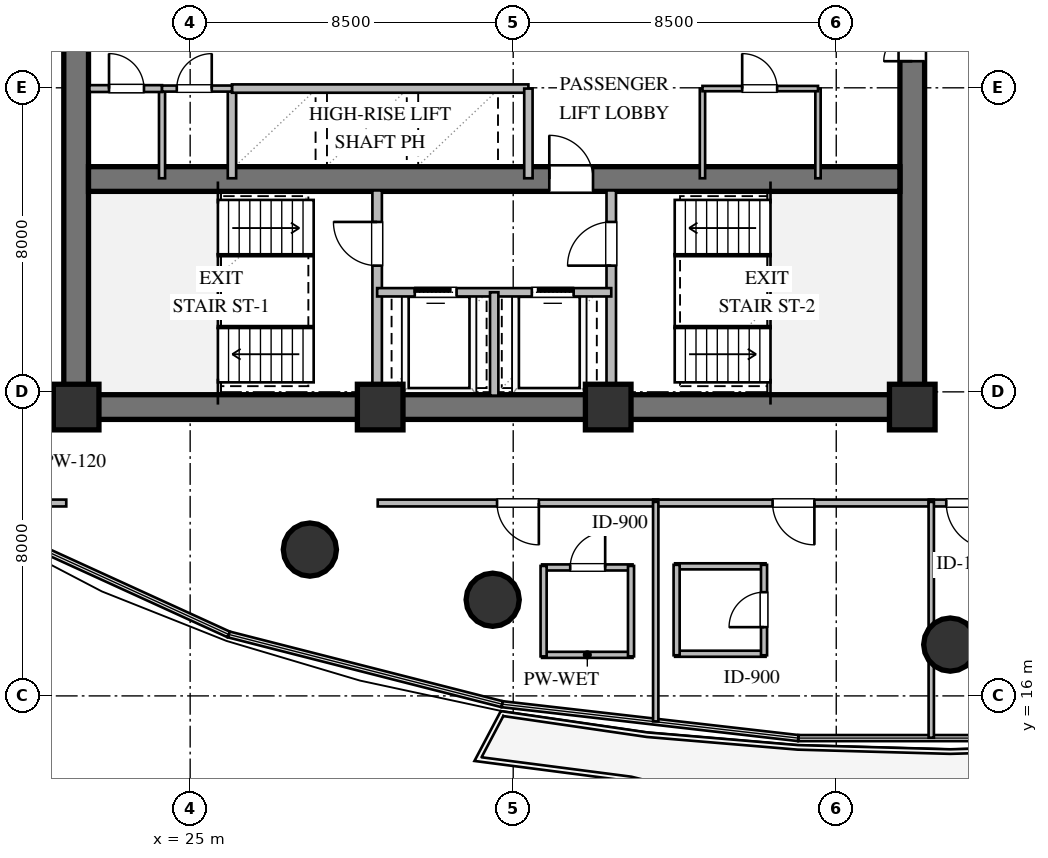
"""IFC4 building model, lengths in metres.
Left out: names, types, materials, properties, quantities, classifications, styles, units other than length and angle.
Written with IfcOpenShell. Run it as: python <this file> out.ifc"""

import sys

from ifc_helpers import new_model, si_unit, direction, frame, frame_2d, origin, origin_2d, place, context, subcontext, project, spatial, rectangle, circle, extrude, element, fill, save


model = new_model("IFC4")
c1 = context("Model", 3, precision=1e-05, world=origin(), true_north=direction((0.0, 1.0)))
c2 = subcontext(c1, "Body", "Model", "MODEL_VIEW")
j1 = project(units=[si_unit("LENGTHUNIT", "METRE"), si_unit("PLANEANGLEUNIT", "RADIAN")], contexts=[c1])
p1 = place(None, origin())
s1 = spatial("IfcSite", under=j1, at=p1, CompositionType="ELEMENT")
p2 = place(p1, origin())
s2 = spatial("IfcBuilding", under=s1, at=p2, CompositionType="ELEMENT")
p3 = place(p2, frame((0.0, 0.0, 34.8)))
s3 = spatial("IfcBuildingStorey", under=s2, at=p3, CompositionType="ELEMENT", Elevation=34.8)
p4 = place(p3, frame((21.675, 23.6, 0.0), z_axis=(0.0, 0.0, 1.0), x_axis=(1.0, 0.0, 0.0)))
e1 = element("IfcWall", 1, at=p4, inside=s3, PredefinedType="SHEAR", context=c2, shape_type="SweptSolid", body=[
    extrude(rectangle(XDim=22.65, YDim=0.65, at=frame_2d((11.325, 0.0))), origin(), (0.0, 0.0, 1.0), 3.36),
])
p5 = place(p3, frame((22.0, 23.925, 0.0), z_axis=(0.0, 0.0, 1.0), x_axis=(0.0, 1.0, 0.0)))
e2 = element("IfcWall", 2, at=p5, inside=s3, PredefinedType="SHEAR", context=c2, shape_type="SweptSolid", body=[
    extrude(rectangle(XDim=12.15, YDim=0.65, at=frame_2d((6.075, 0.0))), origin(), (0.0, 0.0, 1.0), 3.36),
])
p6 = place(p3, frame((44.0, 23.925, 0.0), z_axis=(0.0, 0.0, 1.0), x_axis=(0.0, 1.0, 0.0)))
e3 = element("IfcWall", 3, at=p6, inside=s3, PredefinedType="SHEAR", context=c2, shape_type="SweptSolid", body=[
    extrude(rectangle(XDim=12.15, YDim=0.65, at=frame_2d((6.075, 0.0))), origin(), (0.0, 0.0, 1.0), 3.36),
])
p7 = place(p6, frame((8.775, 0.0, 0.0)))
e4 = element("IfcOpeningElement", 4, at=p7, cuts=e3, PredefinedType="OPENING", context=c2, shape_type="SweptSolid", body=[
    extrude(rectangle(XDim=1.5, YDim=2.15, at=frame_2d((0.75, 1.075))), frame((0.0, 0.335, 0.0), z_axis=(0.0, -1.0, 0.0), x_axis=(1.0, 0.0, 0.0)), (0.0, 0.0, 1.0), 0.67),
])
p8 = place(p3, frame((22.325, 29.6, 0.0), z_axis=(0.0, 0.0, 1.0), x_axis=(1.0, 0.0, 0.0)))
e5 = element("IfcWall", 5, at=p8, inside=s3, PredefinedType="SHEAR", context=c2, shape_type="SweptSolid", body=[
    extrude(rectangle(XDim=21.35, YDim=0.65, at=frame_2d((10.675, 0.0))), origin(), (0.0, 0.0, 1.0), 3.36),
])
p9 = place(p8, frame((12.125, 0.0, 0.0)))
e6 = element("IfcOpeningElement", 6, at=p9, cuts=e5, PredefinedType="OPENING", context=c2, shape_type="SweptSolid", body=[
    extrude(rectangle(XDim=1.15, YDim=2.1, at=frame_2d((0.575, 1.05))), frame((0.0, 0.335, 0.0), z_axis=(0.0, -1.0, 0.0), x_axis=(1.0, 0.0, 0.0)), (0.0, 0.0, 1.0), 0.67),
])
for number, where, z_axis, x_axis in (
    (7, (22.0, 23.6, 0.0), (0.0, 0.0, 1.0), (1.0, 0.0, 0.0)),
    (8, (30.0, 23.6, 0.0), (0.0, 0.0, 1.0), (1.0, 0.0, 0.0)),
    (9, (36.0, 23.6, 0.0), (0.0, 0.0, 1.0), (1.0, 0.0, 0.0)),
    (10, (44.0, 23.6, 0.0), (0.0, 0.0, 1.0), (1.0, 0.0, 0.0)),
):
    element("IfcColumn", number, at=place(p3, frame(where, z_axis=z_axis, x_axis=x_axis)), inside=s3, PredefinedType="COLUMN", context=c2, shape_type="SweptSolid", body=[
        extrude(rectangle(XDim=1.2, YDim=1.2, at=origin_2d()), origin(), (0.0, 0.0, 1.0), 3.6),
    ])
for number, where, z_axis, x_axis in (
    (11, (28.15, 19.85, 0.0), (0.0, 0.0, 1.0), (1.0, 0.0, 0.0)),
    (12, (32.96, 18.53, 0.0), (0.0, 0.0, 1.0), (1.0, 0.0, 0.0)),
    (13, (45.0, 17.35, 0.0), (0.0, 0.0, 1.0), (1.0, 0.0, 0.0)),
):
    element("IfcColumn", number, at=place(p3, frame(where, z_axis=z_axis, x_axis=x_axis)), inside=s3, PredefinedType="COLUMN", context=c2, shape_type="SweptSolid", body=[
        extrude(circle(Radius=0.7, at=origin_2d()), origin(), (0.0, 0.0, 1.0), 3.6),
    ])
p10 = place(p3, frame((29.92, 23.9, 0.0), z_axis=(0.0, 0.0, 1.0), x_axis=(0.0, 1.0, 0.0)))
e14 = element("IfcWall", 14, at=p10, inside=s3, PredefinedType="SOLIDWALL", context=c2, shape_type="SweptSolid", body=[
    extrude(rectangle(XDim=5.4, YDim=0.25, at=frame_2d((2.7, 0.0))), origin(), (0.0, 0.0, 1.0), 3.36),
])
p11 = place(p10, frame((3.421, 0.0, 0.0)))
e15 = element("IfcOpeningElement", 15, at=p11, cuts=e14, PredefinedType="OPENING", context=c2, shape_type="SweptSolid", body=[
    extrude(rectangle(XDim=1.15, YDim=2.1, at=frame_2d((0.575, 1.05))), frame((0.0, 0.135, 0.0), z_axis=(0.0, -1.0, 0.0), x_axis=(1.0, 0.0, 0.0)), (0.0, 0.0, 1.0), 0.27),
])
p12 = place(p3, frame((36.08, 23.9, 0.0), z_axis=(0.0, 0.0, 1.0), x_axis=(0.0, 1.0, 0.0)))
e16 = element("IfcWall", 16, at=p12, inside=s3, PredefinedType="SOLIDWALL", context=c2, shape_type="SweptSolid", body=[
    extrude(rectangle(XDim=5.4, YDim=0.25, at=frame_2d((2.7, 0.0))), origin(), (0.0, 0.0, 1.0), 3.36),
])
p13 = place(p12, frame((3.421, 0.0, 0.0)))
e17 = element("IfcOpeningElement", 17, at=p13, cuts=e16, PredefinedType="OPENING", context=c2, shape_type="SweptSolid", body=[
    extrude(rectangle(XDim=1.15, YDim=2.1, at=frame_2d((0.575, 1.05))), frame((0.0, 0.135, 0.0), z_axis=(0.0, -1.0, 0.0), x_axis=(1.0, 0.0, 0.0)), (0.0, 0.0, 1.0), 0.27),
])
p14 = place(p3, frame((29.92, 26.62, 0.0), z_axis=(0.0, 0.0, 1.0), x_axis=(1.0, 0.0, 0.0)))
e18 = element("IfcWall", 18, at=p14, inside=s3, PredefinedType="SOLIDWALL", context=c2, shape_type="SweptSolid", body=[
    extrude(rectangle(XDim=6.16, YDim=0.22, at=frame_2d((3.08, 0.0))), origin(), (0.0, 0.0, 1.0), 3.36),
])
p15 = place(p14, frame((0.99, 0.0, 0.0)))
e19 = element("IfcOpeningElement", 19, at=p15, cuts=e18, PredefinedType="OPENING", context=c2, shape_type="SweptSolid", body=[
    extrude(rectangle(XDim=1.1, YDim=2.1, at=frame_2d((0.55, 1.05))), frame((0.0, 0.12, 0.0), z_axis=(0.0, -1.0, 0.0), x_axis=(1.0, 0.0, 0.0)), (0.0, 0.0, 1.0), 0.24),
])
p16 = place(p14, frame((4.07, 0.0, 0.0)))
e20 = element("IfcOpeningElement", 20, at=p16, cuts=e18, PredefinedType="OPENING", context=c2, shape_type="SweptSolid", body=[
    extrude(rectangle(XDim=1.1, YDim=2.1, at=frame_2d((0.55, 1.05))), frame((0.0, 0.12, 0.0), z_axis=(0.0, -1.0, 0.0), x_axis=(1.0, 0.0, 0.0)), (0.0, 0.0, 1.0), 0.24),
])
p17 = place(p3, frame((33.0, 23.9, 0.0), z_axis=(0.0, 0.0, 1.0), x_axis=(0.0, 1.0, 0.0)))
e21 = element("IfcWall", 21, at=p17, inside=s3, PredefinedType="SOLIDWALL", context=c2, shape_type="SweptSolid", body=[
    extrude(rectangle(XDim=2.72, YDim=0.22, at=frame_2d((1.36, 0.0))), origin(), (0.0, 0.0, 1.0), 3.36),
])
p18 = place(p3, frame((26.1, 29.62, 0.0), z_axis=(0.0, 0.0, 1.0), x_axis=(0.0, 1.0, 0.0)))
e22 = element("IfcWall", 22, at=p18, inside=s3, PredefinedType="SOLIDWALL", context=c2, shape_type="SweptSolid", body=[
    extrude(rectangle(XDim=2.36, YDim=0.22, at=frame_2d((1.18, 0.0))), origin(), (0.0, 0.0, 1.0), 3.36),
])
p19 = place(p3, frame((26.1, 31.98, 0.0), z_axis=(0.0, 0.0, 1.0), x_axis=(1.0, 0.0, 0.0)))
e23 = element("IfcWall", 23, at=p19, inside=s3, PredefinedType="SOLIDWALL", context=c2, shape_type="SweptSolid", body=[
    extrude(rectangle(XDim=7.8, YDim=0.22, at=frame_2d((3.9, 0.0))), origin(), (0.0, 0.0, 1.0), 3.36),
])
p20 = place(p3, frame((33.9, 29.62, 0.0), z_axis=(0.0, 0.0, 1.0), x_axis=(0.0, 1.0, 0.0)))
e24 = element("IfcWall", 24, at=p20, inside=s3, PredefinedType="SOLIDWALL", context=c2, shape_type="SweptSolid", body=[
    extrude(rectangle(XDim=2.36, YDim=0.22, at=frame_2d((1.18, 0.0))), origin(), (0.0, 0.0, 1.0), 3.36),
])
p21 = place(p3, frame((24.26, 29.62, 0.0), z_axis=(0.0, 0.0, 1.0), x_axis=(0.0, 1.0, 0.0)))
e25 = element("IfcWall", 25, at=p21, inside=s3, PredefinedType="PLUMBINGWALL", context=c2, shape_type="SweptSolid", body=[
    extrude(rectangle(XDim=2.36, YDim=0.16, at=frame_2d((1.18, 0.0))), origin(), (0.0, 0.0, 1.0), 3.36),
])
p22 = place(p3, frame((22.35, 31.98, 0.0), z_axis=(0.0, 0.0, 1.0), x_axis=(1.0, 0.0, 0.0)))
e26 = element("IfcWall", 26, at=p22, inside=s3, PredefinedType="PARTITIONING", context=c2, shape_type="SweptSolid", body=[
    extrude(rectangle(XDim=1.91, YDim=0.18, at=frame_2d((0.955, 0.0))), origin(), (0.0, 0.0, 1.0), 3.36),
])
p23 = place(p22, frame((0.515, 0.0, 0.0)))
e27 = element("IfcOpeningElement", 27, at=p23, cuts=e26, PredefinedType="OPENING", context=c2, shape_type="SweptSolid", body=[
    extrude(rectangle(XDim=0.92, YDim=2.1, at=frame_2d((0.46, 1.05))), frame((0.0, 0.1, 0.0), z_axis=(0.0, -1.0, 0.0), x_axis=(1.0, 0.0, 0.0)), (0.0, 0.0, 1.0), 0.2),
])
p24 = place(p3, frame((24.26, 31.98, 0.0), z_axis=(0.0, 0.0, 1.0), x_axis=(1.0, 0.0, 0.0)))
e28 = element("IfcWall", 28, at=p24, inside=s3, PredefinedType="PLUMBINGWALL", context=c2, shape_type="SweptSolid", body=[
    extrude(rectangle(XDim=1.84, YDim=0.16, at=frame_2d((0.92, 0.0))), origin(), (0.0, 0.0, 1.0), 3.36),
])
p25 = place(p24, frame((0.388, 0.0, 0.0)))
e29 = element("IfcOpeningElement", 29, at=p25, cuts=e28, PredefinedType="OPENING", context=c2, shape_type="SweptSolid", body=[
    extrude(rectangle(XDim=0.92, YDim=2.1, at=frame_2d((0.46, 1.05))), frame((0.0, 0.09, 0.0), z_axis=(0.0, -1.0, 0.0), x_axis=(1.0, 0.0, 0.0)), (0.0, 0.0, 1.0), 0.18),
])
for number, where, z_axis, x_axis in (
    (30, (38.48, 29.62, 0.0), (0.0, 0.0, 1.0), (0.0, 1.0, 0.0)),
    (31, (41.52, 29.62, 0.0), (0.0, 0.0, 1.0), (0.0, 1.0, 0.0)),
):
    element("IfcWall", number, at=place(p3, frame(where, z_axis=z_axis, x_axis=x_axis)), inside=s3, PredefinedType="PARTITIONING", context=c2, shape_type="SweptSolid", body=[
        extrude(rectangle(XDim=2.36, YDim=0.14, at=frame_2d((1.18, 0.0))), origin(), (0.0, 0.0, 1.0), 3.36),
    ])
p26 = place(p3, frame((38.48, 31.98, 0.0), z_axis=(0.0, 0.0, 1.0), x_axis=(1.0, 0.0, 0.0)))
e32 = element("IfcWall", 32, at=p26, inside=s3, PredefinedType="PARTITIONING", context=c2, shape_type="SweptSolid", body=[
    extrude(rectangle(XDim=3.04, YDim=0.14, at=frame_2d((1.52, 0.0))), origin(), (0.0, 0.0, 1.0), 3.36),
])
p27 = place(p26, frame((1.045, 0.0, 0.0)))
e33 = element("IfcOpeningElement", 33, at=p27, cuts=e32, PredefinedType="OPENING", context=c2, shape_type="SweptSolid", body=[
    extrude(rectangle(XDim=0.92, YDim=2.1, at=frame_2d((0.46, 1.05))), frame((0.0, 0.08, 0.0), z_axis=(0.0, -1.0, 0.0), x_axis=(1.0, 0.0, 0.0)), (0.0, 0.0, 1.0), 0.16),
])
p28 = place(p3, frame((34.26, 17.08, 0.0), z_axis=(0.0, 0.0, 1.0), x_axis=(1.0, 0.0, 0.0)))
e34 = element("IfcWall", 34, at=p28, inside=s3, PredefinedType="PLUMBINGWALL", context=c2, shape_type="SweptSolid", body=[
    extrude(rectangle(XDim=2.38, YDim=0.16, at=frame_2d((1.19, 0.0))), origin(), (0.0, 0.0, 1.0), 3.36),
])
p29 = place(p3, frame((34.26, 19.38, 0.0), z_axis=(0.0, 0.0, 1.0), x_axis=(1.0, 0.0, 0.0)))
e35 = element("IfcWall", 35, at=p29, inside=s3, PredefinedType="PLUMBINGWALL", context=c2, shape_type="SweptSolid", body=[
    extrude(rectangle(XDim=2.38, YDim=0.16, at=frame_2d((1.19, 0.0))), origin(), (0.0, 0.0, 1.0), 3.36),
])
p30 = place(p29, frame((0.74, 0.0, 0.0)))
e36 = element("IfcOpeningElement", 36, at=p30, cuts=e35, PredefinedType="OPENING", context=c2, shape_type="SweptSolid", body=[
    extrude(rectangle(XDim=0.92, YDim=2.1, at=frame_2d((0.46, 1.05))), frame((0.0, 0.09, 0.0), z_axis=(0.0, -1.0, 0.0), x_axis=(1.0, 0.0, 0.0)), (0.0, 0.0, 1.0), 0.18),
])
for number, where, z_axis, x_axis in (
    (37, (34.3, 17.04, 0.0), (0.0, 0.0, 1.0), (0.0, 1.0, 0.0)),
    (38, (36.6, 17.04, 0.0), (0.0, 0.0, 1.0), (0.0, 1.0, 0.0)),
    (39, (37.76, 17.109, 0.0), (0.0, 0.0, 1.0), (1.0, 0.0, 0.0)),
    (40, (37.76, 19.409, 0.0), (0.0, 0.0, 1.0), (1.0, 0.0, 0.0)),
    (41, (37.8, 17.069, 0.0), (0.0, 0.0, 1.0), (0.0, 1.0, 0.0)),
):
    element("IfcWall", number, at=place(p3, frame(where, z_axis=z_axis, x_axis=x_axis)), inside=s3, PredefinedType="PLUMBINGWALL", context=c2, shape_type="SweptSolid", body=[
        extrude(rectangle(XDim=2.38, YDim=0.16, at=frame_2d((1.19, 0.0))), origin(), (0.0, 0.0, 1.0), 3.36),
    ])
p31 = place(p3, frame((40.1, 17.069, 0.0), z_axis=(0.0, 0.0, 1.0), x_axis=(0.0, 1.0, 0.0)))
e42 = element("IfcWall", 42, at=p31, inside=s3, PredefinedType="PLUMBINGWALL", context=c2, shape_type="SweptSolid", body=[
    extrude(rectangle(XDim=2.38, YDim=0.16, at=frame_2d((1.19, 0.0))), origin(), (0.0, 0.0, 1.0), 3.36),
])
p32 = place(p31, frame((0.74, 0.0, 0.0)))
e43 = element("IfcOpeningElement", 43, at=p32, cuts=e42, PredefinedType="OPENING", context=c2, shape_type="SweptSolid", body=[
    extrude(rectangle(XDim=0.92, YDim=2.1, at=frame_2d((0.46, 1.05))), frame((0.0, 0.09, 0.0), z_axis=(0.0, -1.0, 0.0), x_axis=(1.0, 0.0, 0.0)), (0.0, 0.0, 1.0), 0.18),
])
p33 = place(p3, frame((37.315, 21.075, 0.0), z_axis=(0.0, 0.0, 1.0), x_axis=(-1.0, 0.0, 0.0)))
e44 = element("IfcWall", 44, at=p33, inside=s3, PredefinedType="PARTITIONING", context=c2, shape_type="SweptSolid", body=[
    extrude(rectangle(XDim=7.38, YDim=0.18, at=frame_2d((3.69, 0.0))), origin(), (0.0, 0.0, 1.0), 2.996),
])
p34 = place(p33, frame((3.14, 0.0, 0.0)))
e45 = element("IfcOpeningElement", 45, at=p34, cuts=e44, PredefinedType="OPENING", context=c2, shape_type="SweptSolid", body=[
    extrude(rectangle(XDim=1.1, YDim=2.1, at=frame_2d((0.55, 1.05))), frame((0.0, 0.1, 0.0), z_axis=(0.0, -1.0, 0.0), x_axis=(1.0, 0.0, 0.0)), (0.0, 0.0, 1.0), 0.2),
])
p35 = place(p3, frame((44.565, 21.075, 0.0), z_axis=(0.0, 0.0, 1.0), x_axis=(-1.0, 0.0, 0.0)))
e46 = element("IfcWall", 46, at=p35, inside=s3, PredefinedType="PARTITIONING", context=c2, shape_type="SweptSolid", body=[
    extrude(rectangle(XDim=7.38, YDim=0.18, at=frame_2d((3.69, 0.0))), origin(), (0.0, 0.0, 1.0), 2.996),
])
p36 = place(p35, frame((3.14, 0.0, 0.0)))
e47 = element("IfcOpeningElement", 47, at=p36, cuts=e46, PredefinedType="OPENING", context=c2, shape_type="SweptSolid", body=[
    extrude(rectangle(XDim=1.1, YDim=2.1, at=frame_2d((0.55, 1.05))), frame((0.0, 0.1, 0.0), z_axis=(0.0, -1.0, 0.0), x_axis=(1.0, 0.0, 0.0)), (0.0, 0.0, 1.0), 0.2),
])
p37 = place(p3, frame((46.555, 21.075, 0.0), z_axis=(0.0, 0.0, 1.0), x_axis=(-1.0, 0.0, 0.0)))
e48 = element("IfcWall", 48, at=p37, inside=s3, PredefinedType="PARTITIONING", context=c2, shape_type="SweptSolid", body=[
    extrude(rectangle(XDim=2.12, YDim=0.18, at=frame_2d((1.06, 0.0))), origin(), (0.0, 0.0, 1.0), 3.36),
])
p38 = place(p37, frame((0.46, 0.0, 0.0)))
e49 = element("IfcOpeningElement", 49, at=p38, cuts=e48, PredefinedType="OPENING", context=c2, shape_type="SweptSolid", body=[
    extrude(rectangle(XDim=1.2, YDim=2.15, at=frame_2d((0.6, 1.075))), frame((0.0, 0.1, 0.0), z_axis=(0.0, -1.0, 0.0), x_axis=(1.0, 0.0, 0.0)), (0.0, 0.0, 1.0), 0.2),
])
p39 = place(p3, frame((21.74, 21.075, 0.0), z_axis=(0.0, 0.0, 1.0), x_axis=(-1.0, 0.0, 0.0)))
e50 = element("IfcWall", 50, at=p39, inside=s3, PredefinedType="PARTITIONING", context=c2, shape_type="SweptSolid", body=[
    extrude(rectangle(XDim=2.645, YDim=0.18, at=frame_2d((1.323, 0.0))), origin(), (0.0, 0.0, 1.0), 3.36),
])
p40 = place(p3, frame((37.25, 21.105, 0.0), z_axis=(0.0, 0.0, 1.0), x_axis=(0.0, -1.0, 0.0)))
e51 = element("IfcWall", 51, at=p40, inside=s3, PredefinedType="PARTITIONING", context=c2, shape_type="SweptSolid", body=[
    extrude(rectangle(XDim=5.776, YDim=0.14, at=frame_2d((2.888, 0.0))), origin(), (0.0, 0.0, 1.0), 3.36),
])
p41 = place(p3, frame((44.5, 21.105, 0.0), z_axis=(0.0, 0.0, 1.0), x_axis=(0.0, -1.0, 0.0)))
e52 = element("IfcWall", 52, at=p41, inside=s3, PredefinedType="PARTITIONING", context=c2, shape_type="SweptSolid", body=[
    extrude(rectangle(XDim=6.205, YDim=0.14, at=frame_2d((3.103, 0.0))), origin(), (0.0, 0.0, 1.0), 2.806),
])
p42 = place(p11, origin())
e53 = element("IfcDoor", 53, at=p42, inside=s3, OperationType="SINGLE_SWING_RIGHT", PredefinedType="DOOR", context=c2, shape_type="SweptSolid", body=[
    extrude(rectangle(XDim=1.15, YDim=2.1, at=frame_2d((0.575, 1.05))), frame((0.0, 0.025, 0.0), z_axis=(0.0, -1.0, 0.0), x_axis=(1.0, 0.0, 0.0)), (0.0, 0.0, 1.0), 0.05),
])
fill(e15, e53)
p43 = place(p13, origin())
e54 = element("IfcDoor", 54, at=p43, inside=s3, OperationType="SINGLE_SWING_LEFT", PredefinedType="DOOR", context=c2, shape_type="SweptSolid", body=[
    extrude(rectangle(XDim=1.15, YDim=2.1, at=frame_2d((0.575, 1.05))), frame((0.0, 0.025, 0.0), z_axis=(0.0, -1.0, 0.0), x_axis=(1.0, 0.0, 0.0)), (0.0, 0.0, 1.0), 0.05),
])
fill(e17, e54)
p44 = place(p15, origin())
e55 = element("IfcDoor", 55, at=p44, inside=s3, OperationType="SLIDING_TO_LEFT", PredefinedType="DOOR", context=c2, shape_type="SweptSolid", body=[
    extrude(rectangle(XDim=1.1, YDim=2.1, at=frame_2d((0.55, 1.05))), frame((0.0, 0.025, 0.0), z_axis=(0.0, -1.0, 0.0), x_axis=(1.0, 0.0, 0.0)), (0.0, 0.0, 1.0), 0.05),
])
fill(e19, e55)
p45 = place(p16, origin())
e56 = element("IfcDoor", 56, at=p45, inside=s3, OperationType="SLIDING_TO_RIGHT", PredefinedType="DOOR", context=c2, shape_type="SweptSolid", body=[
    extrude(rectangle(XDim=1.1, YDim=2.1, at=frame_2d((0.55, 1.05))), frame((0.0, 0.025, 0.0), z_axis=(0.0, -1.0, 0.0), x_axis=(1.0, 0.0, 0.0)), (0.0, 0.0, 1.0), 0.05),
])
fill(e20, e56)
p46 = place(p9, origin())
e57 = element("IfcDoor", 57, at=p46, inside=s3, OperationType="SINGLE_SWING_LEFT", PredefinedType="DOOR", context=c2, shape_type="SweptSolid", body=[
    extrude(rectangle(XDim=1.15, YDim=2.1, at=frame_2d((0.575, 1.05))), frame((0.0, 0.025, 0.0), z_axis=(0.0, -1.0, 0.0), x_axis=(1.0, 0.0, 0.0)), (0.0, 0.0, 1.0), 0.05),
])
fill(e6, e57)
p47 = place(p7, origin())
e58 = element("IfcDoor", 58, at=p47, inside=s3, OperationType="DOUBLE_DOOR_SINGLE_SWING", PredefinedType="DOOR", context=c2, shape_type="SweptSolid", body=[
    extrude(rectangle(XDim=1.5, YDim=2.15, at=frame_2d((0.75, 1.075))), frame((0.0, 0.025, 0.0), z_axis=(0.0, -1.0, 0.0), x_axis=(1.0, 0.0, 0.0)), (0.0, 0.0, 1.0), 0.05),
])
fill(e4, e58)
p48 = place(p23, origin())
e59 = element("IfcDoor", 59, at=p48, inside=s3, OperationType="SINGLE_SWING_LEFT", PredefinedType="DOOR", context=c2, shape_type="SweptSolid", body=[
    extrude(rectangle(XDim=0.92, YDim=2.1, at=frame_2d((0.46, 1.05))), frame((0.0, 0.025, 0.0), z_axis=(0.0, -1.0, 0.0), x_axis=(1.0, 0.0, 0.0)), (0.0, 0.0, 1.0), 0.05),
])
fill(e27, e59)
p49 = place(p25, origin())
e60 = element("IfcDoor", 60, at=p49, inside=s3, OperationType="SINGLE_SWING_RIGHT", PredefinedType="DOOR", context=c2, shape_type="SweptSolid", body=[
    extrude(rectangle(XDim=0.92, YDim=2.1, at=frame_2d((0.46, 1.05))), frame((0.0, 0.025, 0.0), z_axis=(0.0, -1.0, 0.0), x_axis=(1.0, 0.0, 0.0)), (0.0, 0.0, 1.0), 0.05),
])
fill(e29, e60)
p50 = place(p27, origin())
e61 = element("IfcDoor", 61, at=p50, inside=s3, OperationType="SINGLE_SWING_LEFT", PredefinedType="DOOR", context=c2, shape_type="SweptSolid", body=[
    extrude(rectangle(XDim=0.92, YDim=2.1, at=frame_2d((0.46, 1.05))), frame((0.0, 0.025, 0.0), z_axis=(0.0, -1.0, 0.0), x_axis=(1.0, 0.0, 0.0)), (0.0, 0.0, 1.0), 0.05),
])
fill(e33, e61)
p51 = place(p30, origin())
e62 = element("IfcDoor", 62, at=p51, inside=s3, OperationType="SINGLE_SWING_RIGHT", PredefinedType="DOOR", context=c2, shape_type="SweptSolid", body=[
    extrude(rectangle(XDim=0.92, YDim=2.1, at=frame_2d((0.46, 1.05))), frame((0.0, 0.025, 0.0), z_axis=(0.0, -1.0, 0.0), x_axis=(1.0, 0.0, 0.0)), (0.0, 0.0, 1.0), 0.05),
])
fill(e36, e62)
p52 = place(p32, origin())
e63 = element("IfcDoor", 63, at=p52, inside=s3, OperationType="SINGLE_SWING_LEFT", PredefinedType="DOOR", context=c2, shape_type="SweptSolid", body=[
    extrude(rectangle(XDim=0.92, YDim=2.1, at=frame_2d((0.46, 1.05))), frame((0.0, 0.025, 0.0), z_axis=(0.0, -1.0, 0.0), x_axis=(1.0, 0.0, 0.0)), (0.0, 0.0, 1.0), 0.05),
])
fill(e43, e63)
p53 = place(p34, origin())
e64 = element("IfcDoor", 64, at=p53, inside=s3, OperationType="SINGLE_SWING_LEFT", PredefinedType="DOOR", context=c2, shape_type="SweptSolid", body=[
    extrude(rectangle(XDim=1.1, YDim=2.1, at=frame_2d((0.55, 1.05))), frame((0.0, 0.025, 0.0), z_axis=(0.0, -1.0, 0.0), x_axis=(1.0, 0.0, 0.0)), (0.0, 0.0, 1.0), 0.05),
])
fill(e45, e64)
p54 = place(p36, origin())
e65 = element("IfcDoor", 65, at=p54, inside=s3, OperationType="SINGLE_SWING_LEFT", PredefinedType="DOOR", context=c2, shape_type="SweptSolid", body=[
    extrude(rectangle(XDim=1.1, YDim=2.1, at=frame_2d((0.55, 1.05))), frame((0.0, 0.025, 0.0), z_axis=(0.0, -1.0, 0.0), x_axis=(1.0, 0.0, 0.0)), (0.0, 0.0, 1.0), 0.05),
])
fill(e47, e65)
p55 = place(p38, origin())
e66 = element("IfcDoor", 66, at=p55, inside=s3, OperationType="SINGLE_SWING_LEFT", PredefinedType="DOOR", context=c2, shape_type="SweptSolid", body=[
    extrude(rectangle(XDim=1.2, YDim=2.15, at=frame_2d((0.6, 1.075))), frame((0.0, 0.025, 0.0), z_axis=(0.0, -1.0, 0.0), x_axis=(1.0, 0.0, 0.0)), (0.0, 0.0, 1.0), 0.05),
])
fill(e49, e66)
save(model, sys.argv[1])
